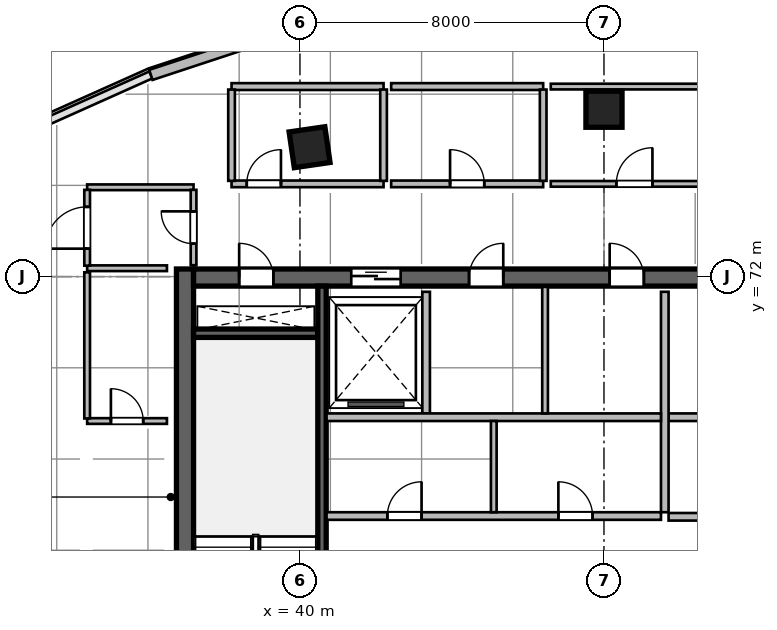
"""IFC4 building model, lengths in metres.
Left out: names, types, materials, properties, quantities, classifications, styles, units other than length and angle.
Written with IfcOpenShell. Run it as: python <this file> out.ifc"""

import sys

from ifc_helpers import new_model, si_unit, direction, frame, frame_2d, origin, origin_2d, place, context, subcontext, project, spatial, rectangle, extrude, source, transform, mapped, element, fill, save


model = new_model("IFC4")
c1 = context("Model", 3, precision=1e-05, world=origin(), true_north=direction((0.0, 1.0)))
c2 = subcontext(c1, "Body", "Model", "MODEL_VIEW")
j1 = project(units=[si_unit("LENGTHUNIT", "METRE"), si_unit("PLANEANGLEUNIT", "RADIAN")], contexts=[c1])
p1 = place(None, origin())
s1 = spatial("IfcSite", under=j1, at=p1, CompositionType="ELEMENT")
p2 = place(p1, origin())
s2 = spatial("IfcBuilding", under=s1, at=p2, CompositionType="ELEMENT")
p3 = place(p2, frame((0.0, 0.0, 231.3)))
s3 = spatial("IfcBuildingStorey", under=s2, at=p3, CompositionType="ELEMENT", Elevation=231.3)
m1 = source(origin(), c2, "Body", "SweptSolid", [
    extrude(rectangle(XDim=12.0, YDim=0.45, at=frame_2d((6.0, 0.0))), origin(), (0.0, 0.0, 1.0), 3.9),
])
p4 = place(p3, frame((36.975, 60.2, 0.0), z_axis=(0.0, 0.0, 1.0), x_axis=(0.0, 1.0, 0.0)))
e1 = element("IfcWall", 1, at=p4, inside=s3, PredefinedType="SHEAR", context=c2, shape_type="MappedRepresentation", body=[
    mapped(m1, transform((0.0, 0.0, 0.0), scale=1.0)),
])
m2 = source(origin(), c2, "Body", "SweptSolid", [
    extrude(rectangle(XDim=21.6, YDim=0.45, at=frame_2d((10.8, 0.0))), origin(), (0.0, 0.0, 1.0), 3.9),
])
p5 = place(p3, frame((37.2, 71.975, 0.0), z_axis=(0.0, 0.0, 1.0), x_axis=(1.0, 0.0, 0.0)))
e2 = element("IfcWall", 2, at=p5, inside=s3, PredefinedType="SHEAR", context=c2, shape_type="MappedRepresentation", body=[
    mapped(m2, transform((0.0, 0.0, 0.0), scale=1.0)),
])
p6 = place(p5, frame((1.2, 0.0, 0.0)))
e3 = element("IfcOpeningElement", 3, at=p6, cuts=e2, PredefinedType="OPENING", context=c2, shape_type="SweptSolid", body=[
    extrude(rectangle(XDim=0.9, YDim=2.1, at=frame_2d((0.45, 1.05))), frame((0.0, 0.235, 0.0), z_axis=(0.0, -1.0, 0.0), x_axis=(1.0, 0.0, 0.0)), (0.0, 0.0, 1.0), 0.47),
])
p7 = place(p5, frame((14.7, 0.0, 0.0)))
e4 = element("IfcOpeningElement", 4, at=p7, cuts=e2, PredefinedType="OPENING", context=c2, shape_type="SweptSolid", body=[
    extrude(rectangle(XDim=1.2, YDim=2.15, at=frame_2d((0.6, 1.075))), frame((0.0, 0.235, 0.0), z_axis=(0.0, -1.0, 0.0), x_axis=(1.0, 0.0, 0.0)), (0.0, 0.0, 1.0), 0.47),
])
p8 = place(p5, frame((4.15, 0.0, 0.0)))
e5 = element("IfcOpeningElement", 5, at=p8, cuts=e2, PredefinedType="OPENING", context=c2, shape_type="SweptSolid", body=[
    extrude(rectangle(XDim=1.3, YDim=2.15, at=frame_2d((0.65, 1.075))), frame((0.0, 0.235, 0.0), z_axis=(0.0, -1.0, 0.0), x_axis=(1.0, 0.0, 0.0)), (0.0, 0.0, 1.0), 0.47),
])
p9 = place(p5, frame((7.25, 0.0, 0.0)))
e6 = element("IfcOpeningElement", 6, at=p9, cuts=e2, PredefinedType="OPENING", context=c2, shape_type="SweptSolid", body=[
    extrude(rectangle(XDim=0.9, YDim=2.1, at=frame_2d((0.45, 1.05))), frame((0.0, 0.235, 0.0), z_axis=(0.0, -1.0, 0.0), x_axis=(1.0, 0.0, 0.0)), (0.0, 0.0, 1.0), 0.47),
])
p10 = place(p5, frame((10.95, 0.0, 0.0)))
e7 = element("IfcOpeningElement", 7, at=p10, cuts=e2, PredefinedType="OPENING", context=c2, shape_type="SweptSolid", body=[
    extrude(rectangle(XDim=0.9, YDim=2.1, at=frame_2d((0.45, 1.05))), frame((0.0, 0.235, 0.0), z_axis=(0.0, -1.0, 0.0), x_axis=(1.0, 0.0, 0.0)), (0.0, 0.0, 1.0), 0.47),
])
m3 = source(origin(), c2, "Body", "SweptSolid", [
    extrude(rectangle(XDim=3.27, YDim=0.22, at=frame_2d((1.635, 0.0))), origin(), (0.0, 0.0, 1.0), 3.9),
])
p11 = place(p3, frame((37.2, 70.51, 0.0), z_axis=(0.0, 0.0, 1.0), x_axis=(1.0, 0.0, 0.0)))
e8 = element("IfcWall", 8, at=p11, inside=s3, PredefinedType="SHEAR", context=c2, shape_type="MappedRepresentation", body=[
    mapped(m3, transform((0.0, 0.0, 0.0), scale=1.0)),
])
m4 = source(origin(), c2, "Body", "SweptSolid", [
    extrude(rectangle(XDim=11.1, YDim=0.22, at=frame_2d((5.55, 0.0))), origin(), (0.0, 0.0, 1.0), 3.9),
])
p12 = place(p3, frame((40.58, 60.65, 0.0), z_axis=(0.0, 0.0, 1.0), x_axis=(0.0, 1.0, 0.0)))
e9 = element("IfcWall", 9, at=p12, inside=s3, PredefinedType="SHEAR", context=c2, shape_type="MappedRepresentation", body=[
    mapped(m4, transform((0.0, 0.0, 0.0), scale=1.0)),
])
m5 = source(origin(), c2, "Body", "SweptSolid", [
    extrude(rectangle(XDim=0.95, YDim=0.95, at=origin_2d()), origin(), (0.0, 0.0, 1.0), 3.9),
])
for number, where, z_axis, x_axis in (
    (10, (40.253, 75.404, 0.0), (0.0, 0.0, 1.0), (-0.143, 0.99, 0.0)),
    (11, (48.0, 76.404, 0.0), (0.0, 0.0, 1.0), (0.0, 1.0, 0.0)),
):
    element("IfcColumn", number, at=place(p3, frame(where, z_axis=z_axis, x_axis=x_axis)), inside=s3, PredefinedType="COLUMN", context=c2, shape_type="MappedRepresentation", body=[
        mapped(m5, transform((0.0, 0.0, 0.0), scale=1.0)),
    ])
m6 = source(origin(), c2, "Body", "SweptSolid", [
    extrude(rectangle(XDim=3.557, YDim=0.28, at=frame_2d((1.778, 0.0))), origin(), (0.0, 0.0, 1.0), 3.65),
])
p13 = place(p3, frame((36.077, 77.307, 0.0), z_axis=(0.0, 0.0, 1.0), x_axis=(0.949687460385, 0.31319918197, 0.0)))
e12 = element("IfcWall", 12, at=p13, inside=s3, PredefinedType="SOLIDWALL", context=c2, shape_type="MappedRepresentation", body=[
    mapped(m6, transform((0.0, 0.0, 0.0), scale=1.0)),
])
m7 = source(origin(), c2, "Body", "SweptSolid", [
    extrude(rectangle(XDim=5.62, YDim=0.2, at=frame_2d((2.81, 0.0))), origin(), (0.0, 0.0, 1.0), 3.65),
])
p14 = place(p3, frame((49.7, 68.3, 0.0), z_axis=(0.0, 0.0, 1.0), x_axis=(1.0, 0.0, 0.0)))
e13 = element("IfcWall", 13, at=p14, inside=s3, PredefinedType="SOLIDWALL", context=c2, shape_type="MappedRepresentation", body=[
    mapped(m7, transform((0.0, 0.0, 0.0), scale=1.0)),
])
p15 = place(p14, frame((1.6, 0.0, 0.0)))
e14 = element("IfcOpeningElement", 14, at=p15, cuts=e13, PredefinedType="OPENING", context=c2, shape_type="SweptSolid", body=[
    extrude(rectangle(XDim=1.1, YDim=2.15, at=frame_2d((0.55, 1.075))), frame((0.0, 0.11, 0.0), z_axis=(0.0, -1.0, 0.0), x_axis=(1.0, 0.0, 0.0)), (0.0, 0.0, 1.0), 0.22),
])
p16 = place(p14, frame((3.7, 0.0, 0.0)))
e15 = element("IfcOpeningElement", 15, at=p16, cuts=e13, PredefinedType="OPENING", context=c2, shape_type="SweptSolid", body=[
    extrude(rectangle(XDim=1.1, YDim=2.15, at=frame_2d((0.55, 1.075))), frame((0.0, 0.11, 0.0), z_axis=(0.0, -1.0, 0.0), x_axis=(1.0, 0.0, 0.0)), (0.0, 0.0, 1.0), 0.22),
])
m8 = source(origin(), c2, "Body", "SweptSolid", [
    extrude(rectangle(XDim=5.8, YDim=0.2, at=frame_2d((2.9, 0.0))), origin(), (0.0, 0.0, 1.0), 3.65),
])
p17 = place(p3, frame((49.6, 65.8, 0.0), z_axis=(0.0, 0.0, 1.0), x_axis=(0.0, 1.0, 0.0)))
e16 = element("IfcWall", 16, at=p17, inside=s3, PredefinedType="SOLIDWALL", context=c2, shape_type="MappedRepresentation", body=[
    mapped(m8, transform((0.0, 0.0, 0.0), scale=1.0)),
])
p18 = place(p3, frame((49.7, 65.68, 0.0), z_axis=(0.0, 0.0, 1.0), x_axis=(1.0, 0.0, 0.0)))
e17 = element("IfcWall", 17, at=p18, inside=s3, PredefinedType="SOLIDWALL", context=c2, shape_type="MappedRepresentation", body=[
    mapped(m7, transform((0.0, 0.0, 0.0), scale=1.0)),
])
m9 = source(origin(), c2, "Body", "SweptSolid", [
    extrude(rectangle(XDim=3.2, YDim=0.2, at=frame_2d((1.6, 0.0))), origin(), (0.0, 0.0, 1.0), 3.65),
])
p19 = place(p3, frame((43.32, 68.4, 0.0), z_axis=(0.0, 0.0, 1.0), x_axis=(0.0, 1.0, 0.0)))
e18 = element("IfcWall", 18, at=p19, inside=s3, PredefinedType="SOLIDWALL", context=c2, shape_type="MappedRepresentation", body=[
    mapped(m9, transform((0.0, 0.0, 0.0), scale=1.0)),
])
m10 = source(origin(), c2, "Body", "SweptSolid", [
    extrude(rectangle(XDim=8.8, YDim=0.2, at=frame_2d((4.4, 0.0))), origin(), (0.0, 0.0, 1.0), 3.65),
])
p20 = place(p3, frame((40.7, 68.3, 0.0), z_axis=(0.0, 0.0, 1.0), x_axis=(1.0, 0.0, 0.0)))
e19 = element("IfcWall", 19, at=p20, inside=s3, PredefinedType="SOLIDWALL", context=c2, shape_type="MappedRepresentation", body=[
    mapped(m10, transform((0.0, 0.0, 0.0), scale=1.0)),
])
m11 = source(origin(), c2, "Body", "SweptSolid", [
    extrude(rectangle(XDim=3.33, YDim=0.15, at=frame_2d((1.665, 0.0))), origin(), (0.0, 0.0, 1.0), 3.65),
])
p21 = place(p3, frame((46.45, 68.4, 0.0), z_axis=(0.0, 0.0, 1.0), x_axis=(0.0, 1.0, 0.0)))
e20 = element("IfcWall", 20, at=p21, inside=s3, PredefinedType="PARTITIONING", context=c2, shape_type="MappedRepresentation", body=[
    mapped(m11, transform((0.0, 0.0, 0.0), scale=1.0)),
])
p22 = place(p3, frame((40.7, 65.7, 0.0), z_axis=(0.0, 0.0, 1.0), x_axis=(1.0, 0.0, 0.0)))
e21 = element("IfcWall", 21, at=p22, inside=s3, PredefinedType="SOLIDWALL", context=c2, shape_type="MappedRepresentation", body=[
    mapped(m10, transform((0.0, 0.0, 0.0), scale=1.0)),
])
p23 = place(p22, frame((1.6, 0.0, 0.0)))
e22 = element("IfcOpeningElement", 22, at=p23, cuts=e21, PredefinedType="OPENING", context=c2, shape_type="SweptSolid", body=[
    extrude(rectangle(XDim=0.9, YDim=2.1, at=frame_2d((0.45, 1.05))), frame((0.0, 0.11, 0.0), z_axis=(0.0, -1.0, 0.0), x_axis=(1.0, 0.0, 0.0)), (0.0, 0.0, 1.0), 0.22),
])
p24 = place(p22, frame((6.1, 0.0, 0.0)))
e23 = element("IfcOpeningElement", 23, at=p24, cuts=e21, PredefinedType="OPENING", context=c2, shape_type="SweptSolid", body=[
    extrude(rectangle(XDim=0.9, YDim=2.1, at=frame_2d((0.45, 1.05))), frame((0.0, 0.11, 0.0), z_axis=(0.0, -1.0, 0.0), x_axis=(1.0, 0.0, 0.0)), (0.0, 0.0, 1.0), 0.22),
])
m12 = source(origin(), c2, "Body", "SweptSolid", [
    extrude(rectangle(XDim=2.4, YDim=0.15, at=frame_2d((1.2, 0.0))), origin(), (0.0, 0.0, 1.0), 3.65),
])
p25 = place(p3, frame((45.1, 65.8, 0.0), z_axis=(0.0, 0.0, 1.0), x_axis=(0.0, 1.0, 0.0)))
e24 = element("IfcWall", 24, at=p25, inside=s3, PredefinedType="PARTITIONING", context=c2, shape_type="MappedRepresentation", body=[
    mapped(m12, transform((0.0, 0.0, 0.0), scale=1.0)),
])
m13 = source(origin(), c2, "Body", "SweptSolid", [
    extrude(rectangle(XDim=2.1, YDim=0.15, at=frame_2d((1.05, 0.0))), origin(), (0.0, 0.0, 1.0), 3.65),
])
p26 = place(p3, frame((34.4, 72.22, 0.0), z_axis=(0.0, 0.0, 1.0), x_axis=(1.0, 0.0, 0.0)))
e25 = element("IfcWall", 25, at=p26, inside=s3, PredefinedType="PARTITIONING", context=c2, shape_type="MappedRepresentation", body=[
    mapped(m13, transform((0.0, 0.0, 0.0), scale=1.0)),
])
m14 = source(origin(), c2, "Body", "SweptSolid", [
    extrude(rectangle(XDim=2.8, YDim=0.15, at=frame_2d((1.4, 0.0))), origin(), (0.0, 0.0, 1.0), 3.65),
])
p27 = place(p3, frame((34.4, 74.35, 0.0), z_axis=(0.0, 0.0, 1.0), x_axis=(1.0, 0.0, 0.0)))
e26 = element("IfcWall", 26, at=p27, inside=s3, PredefinedType="PARTITIONING", context=c2, shape_type="MappedRepresentation", body=[
    mapped(m14, transform((0.0, 0.0, 0.0), scale=1.0)),
])
m15 = source(origin(), c2, "Body", "SweptSolid", [
    extrude(rectangle(XDim=1.995, YDim=0.15, at=frame_2d((0.998, 0.0))), origin(), (0.0, 0.0, 1.0), 3.65),
])
p28 = place(p3, frame((34.4, 72.288, 0.0), z_axis=(0.0, 0.0, 1.0), x_axis=(0.0, 1.0, 0.0)))
e27 = element("IfcWall", 27, at=p28, inside=s3, PredefinedType="PARTITIONING", context=c2, shape_type="MappedRepresentation", body=[
    mapped(m15, transform((0.0, 0.0, 0.0), scale=1.0)),
])
p29 = place(p28, frame((0.448, 0.0, 0.0)))
e28 = element("IfcOpeningElement", 28, at=p29, cuts=e27, PredefinedType="OPENING", context=c2, shape_type="SweptSolid", body=[
    extrude(rectangle(XDim=1.1, YDim=2.15, at=frame_2d((0.55, 1.075))), frame((0.0, 0.085, 0.0), z_axis=(0.0, -1.0, 0.0), x_axis=(1.0, 0.0, 0.0)), (0.0, 0.0, 1.0), 0.17),
])
m16 = source(origin(), c2, "Body", "SweptSolid", [
    extrude(rectangle(XDim=1.982, YDim=0.15, at=frame_2d((0.991, 0.0))), origin(), (0.0, 0.0, 1.0), 3.65),
])
p30 = place(p3, frame((37.2, 72.3, 0.0), z_axis=(0.0, 0.0, 1.0), x_axis=(0.0, 1.0, 0.0)))
e29 = element("IfcWall", 29, at=p30, inside=s3, PredefinedType="PARTITIONING", context=c2, shape_type="MappedRepresentation", body=[
    mapped(m16, transform((0.0, 0.0, 0.0), scale=1.0)),
])
p31 = place(p30, frame((0.566, 0.0, 0.0)))
e30 = element("IfcOpeningElement", 30, at=p31, cuts=e29, PredefinedType="OPENING", context=c2, shape_type="SweptSolid", body=[
    extrude(rectangle(XDim=0.85, YDim=2.1, at=frame_2d((0.425, 1.05))), frame((0.0, 0.085, 0.0), z_axis=(0.0, -1.0, 0.0), x_axis=(1.0, 0.0, 0.0)), (0.0, 0.0, 1.0), 0.17),
])
p32 = place(p3, frame((34.4, 68.2, 0.0), z_axis=(0.0, 0.0, 1.0), x_axis=(1.0, 0.0, 0.0)))
e31 = element("IfcWall", 31, at=p32, inside=s3, PredefinedType="PARTITIONING", context=c2, shape_type="MappedRepresentation", body=[
    mapped(m13, transform((0.0, 0.0, 0.0), scale=1.0)),
])
p33 = place(p32, frame((0.625, 0.0, 0.0)))
e32 = element("IfcOpeningElement", 32, at=p33, cuts=e31, PredefinedType="OPENING", context=c2, shape_type="SweptSolid", body=[
    extrude(rectangle(XDim=0.85, YDim=2.1, at=frame_2d((0.425, 1.05))), frame((0.0, 0.085, 0.0), z_axis=(0.0, -1.0, 0.0), x_axis=(1.0, 0.0, 0.0)), (0.0, 0.0, 1.0), 0.17),
])
m17 = source(origin(), c2, "Body", "SweptSolid", [
    extrude(rectangle(XDim=3.845, YDim=0.15, at=frame_2d((1.922, 0.0))), origin(), (0.0, 0.0, 1.0), 3.65),
])
p34 = place(p3, frame((34.4, 68.268, 0.0), z_axis=(0.0, 0.0, 1.0), x_axis=(0.0, 1.0, 0.0)))
e33 = element("IfcWall", 33, at=p34, inside=s3, PredefinedType="PARTITIONING", context=c2, shape_type="MappedRepresentation", body=[
    mapped(m17, transform((0.0, 0.0, 0.0), scale=1.0)),
])
m18 = source(origin(), c2, "Body", "SweptSolid", [
    extrude(rectangle(XDim=4.0, YDim=0.175, at=frame_2d((2.0, 0.0))), origin(), (0.0, 0.0, 1.0), 3.65),
])
p35 = place(p3, frame((38.2, 74.44, 0.0), z_axis=(0.0, 0.0, 1.0), x_axis=(1.0, 0.0, 0.0)))
e34 = element("IfcWall", 34, at=p35, inside=s3, PredefinedType="PARTITIONING", context=c2, shape_type="MappedRepresentation", body=[
    mapped(m18, transform((0.0, 0.0, 0.0), scale=1.0)),
])
p36 = place(p35, frame((0.4, 0.0, 0.0)))
e35 = element("IfcOpeningElement", 35, at=p36, cuts=e34, PredefinedType="OPENING", context=c2, shape_type="SweptSolid", body=[
    extrude(rectangle(XDim=0.9, YDim=2.08, at=frame_2d((0.45, 1.04))), frame((0.0, 0.098, 0.0), z_axis=(0.0, -1.0, 0.0), x_axis=(1.0, 0.0, 0.0)), (0.0, 0.0, 1.0), 0.195),
])
m19 = source(origin(), c2, "Body", "SweptSolid", [
    extrude(rectangle(XDim=4.0, YDim=0.18, at=frame_2d((2.0, 0.0))), origin(), (0.0, 0.0, 1.0), 3.65),
])
p37 = place(p3, frame((38.2, 77.0, 0.0), z_axis=(0.0, 0.0, 1.0), x_axis=(1.0, 0.0, 0.0)))
e36 = element("IfcWall", 36, at=p37, inside=s3, PredefinedType="PLUMBINGWALL", context=c2, shape_type="MappedRepresentation", body=[
    mapped(m19, transform((0.0, 0.0, 0.0), scale=1.0)),
])
m20 = source(origin(), c2, "Body", "SweptSolid", [
    extrude(rectangle(XDim=2.403, YDim=0.175, at=frame_2d((1.201, 0.0))), origin(), (0.0, 0.0, 1.0), 3.65),
])
for number, where, z_axis, x_axis in (
    (37, (38.2, 74.519, 0.0), (0.0, 0.0, 1.0), (0.0, 1.0, 0.0)),
    (38, (42.2, 74.519, 0.0), (0.0, 0.0, 1.0), (0.0, 1.0, 0.0)),
):
    element("IfcWall", number, at=place(p3, frame(where, z_axis=z_axis, x_axis=x_axis)), inside=s3, PredefinedType="PARTITIONING", context=c2, shape_type="MappedRepresentation", body=[
        mapped(m20, transform((0.0, 0.0, 0.0), scale=1.0)),
    ])
p38 = place(p3, frame((42.4, 74.44, 0.0), z_axis=(0.0, 0.0, 1.0), x_axis=(1.0, 0.0, 0.0)))
e39 = element("IfcWall", 39, at=p38, inside=s3, PredefinedType="PARTITIONING", context=c2, shape_type="MappedRepresentation", body=[
    mapped(m18, transform((0.0, 0.0, 0.0), scale=1.0)),
])
p39 = place(p38, frame((1.55, 0.0, 0.0)))
e40 = element("IfcOpeningElement", 40, at=p39, cuts=e39, PredefinedType="OPENING", context=c2, shape_type="SweptSolid", body=[
    extrude(rectangle(XDim=0.9, YDim=2.08, at=frame_2d((0.45, 1.04))), frame((0.0, 0.098, 0.0), z_axis=(0.0, -1.0, 0.0), x_axis=(1.0, 0.0, 0.0)), (0.0, 0.0, 1.0), 0.195),
])
p40 = place(p3, frame((42.4, 77.0, 0.0), z_axis=(0.0, 0.0, 1.0), x_axis=(1.0, 0.0, 0.0)))
e41 = element("IfcWall", 41, at=p40, inside=s3, PredefinedType="PLUMBINGWALL", context=c2, shape_type="MappedRepresentation", body=[
    mapped(m19, transform((0.0, 0.0, 0.0), scale=1.0)),
])
p41 = place(p3, frame((46.4, 74.519, 0.0), z_axis=(0.0, 0.0, 1.0), x_axis=(0.0, 1.0, 0.0)))
e42 = element("IfcWall", 42, at=p41, inside=s3, PredefinedType="PARTITIONING", context=c2, shape_type="MappedRepresentation", body=[
    mapped(m20, transform((0.0, 0.0, 0.0), scale=1.0)),
])
m21 = source(origin(), c2, "Body", "SweptSolid", [
    extrude(rectangle(XDim=4.4, YDim=0.15, at=frame_2d((2.2, 0.0))), origin(), (0.0, 0.0, 1.0), 3.65),
])
p42 = place(p3, frame((46.6, 74.44, 0.0), z_axis=(0.0, 0.0, 1.0), x_axis=(1.0, 0.0, 0.0)))
e43 = element("IfcWall", 43, at=p42, inside=s3, PredefinedType="PARTITIONING", context=c2, shape_type="MappedRepresentation", body=[
    mapped(m21, transform((0.0, 0.0, 0.0), scale=1.0)),
])
p43 = place(p42, frame((1.725, 0.0, 0.0)))
e44 = element("IfcOpeningElement", 44, at=p43, cuts=e43, PredefinedType="OPENING", context=c2, shape_type="SweptSolid", body=[
    extrude(rectangle(XDim=0.95, YDim=2.1, at=frame_2d((0.475, 1.05))), frame((0.0, 0.085, 0.0), z_axis=(0.0, -1.0, 0.0), x_axis=(1.0, 0.0, 0.0)), (0.0, 0.0, 1.0), 0.17),
])
p44 = place(p3, frame((46.6, 77.0, 0.0), z_axis=(0.0, 0.0, 1.0), x_axis=(1.0, 0.0, 0.0)))
e45 = element("IfcWall", 45, at=p44, inside=s3, PredefinedType="PARTITIONING", context=c2, shape_type="MappedRepresentation", body=[
    mapped(m21, transform((0.0, 0.0, 0.0), scale=1.0)),
])
m22 = source(origin(), c2, "Body", "SweptSolid", [
    extrude(rectangle(XDim=0.9, YDim=2.1, at=frame_2d((0.45, 1.05))), frame((0.0, 0.025, 0.0), z_axis=(0.0, -1.0, 0.0), x_axis=(1.0, 0.0, 0.0)), (0.0, 0.0, 1.0), 0.05),
])
p45 = place(p6, origin())
e46 = element("IfcDoor", 46, at=p45, inside=s3, OperationType="SINGLE_SWING_LEFT", PredefinedType="DOOR", context=c2, shape_type="MappedRepresentation", body=[
    mapped(m22, transform((0.0, 0.0, 0.0), scale=1.0)),
])
fill(e3, e46)
m23 = source(origin(), c2, "Body", "SweptSolid", [
    extrude(rectangle(XDim=1.3, YDim=2.15, at=frame_2d((0.65, 1.075))), frame((0.0, 0.025, 0.0), z_axis=(0.0, -1.0, 0.0), x_axis=(1.0, 0.0, 0.0)), (0.0, 0.0, 1.0), 0.05),
])
p46 = place(p8, origin())
e47 = element("IfcDoor", 47, at=p46, inside=s3, OperationType="DOUBLE_DOOR_SLIDING", PredefinedType="DOOR", context=c2, shape_type="MappedRepresentation", body=[
    mapped(m23, transform((0.0, 0.0, 0.0), scale=1.0)),
])
fill(e5, e47)
p47 = place(p9, origin())
e48 = element("IfcDoor", 48, at=p47, inside=s3, OperationType="SINGLE_SWING_RIGHT", PredefinedType="DOOR", context=c2, shape_type="MappedRepresentation", body=[
    mapped(m22, transform((0.0, 0.0, 0.0), scale=1.0)),
])
fill(e6, e48)
p48 = place(p10, origin())
e49 = element("IfcDoor", 49, at=p48, inside=s3, OperationType="SINGLE_SWING_LEFT", PredefinedType="DOOR", context=c2, shape_type="MappedRepresentation", body=[
    mapped(m22, transform((0.0, 0.0, 0.0), scale=1.0)),
])
fill(e7, e49)
p49 = place(p23, origin())
e50 = element("IfcDoor", 50, at=p49, inside=s3, OperationType="SINGLE_SWING_RIGHT", PredefinedType="DOOR", context=c2, shape_type="MappedRepresentation", body=[
    mapped(m22, transform((0.0, 0.0, 0.0), scale=1.0)),
])
fill(e22, e50)
p50 = place(p24, origin())
e51 = element("IfcDoor", 51, at=p50, inside=s3, OperationType="SINGLE_SWING_LEFT", PredefinedType="DOOR", context=c2, shape_type="MappedRepresentation", body=[
    mapped(m22, transform((0.0, 0.0, 0.0), scale=1.0)),
])
fill(e23, e51)
m24 = source(origin(), c2, "Body", "SweptSolid", [
    extrude(rectangle(XDim=0.85, YDim=2.1, at=frame_2d((0.425, 1.05))), frame((0.0, 0.025, 0.0), z_axis=(0.0, -1.0, 0.0), x_axis=(1.0, 0.0, 0.0)), (0.0, 0.0, 1.0), 0.05),
])
p51 = place(p31, origin())
e52 = element("IfcDoor", 52, at=p51, inside=s3, OperationType="SINGLE_SWING_RIGHT", PredefinedType="DOOR", context=c2, shape_type="MappedRepresentation", body=[
    mapped(m24, transform((0.0, 0.0, 0.0), scale=1.0)),
])
fill(e30, e52)
p52 = place(p33, origin())
e53 = element("IfcDoor", 53, at=p52, inside=s3, OperationType="SINGLE_SWING_LEFT", PredefinedType="DOOR", context=c2, shape_type="MappedRepresentation", body=[
    mapped(m24, transform((0.0, 0.0, 0.0), scale=1.0)),
])
fill(e32, e53)
m25 = source(origin(), c2, "Body", "SweptSolid", [
    extrude(rectangle(XDim=0.9, YDim=2.08, at=frame_2d((0.45, 1.04))), frame((0.0, 0.025, 0.0), z_axis=(0.0, -1.0, 0.0), x_axis=(1.0, 0.0, 0.0)), (0.0, 0.0, 1.0), 0.05),
])
p53 = place(p36, origin())
e54 = element("IfcDoor", 54, at=p53, inside=s3, OperationType="SINGLE_SWING_RIGHT", PredefinedType="DOOR", context=c2, shape_type="MappedRepresentation", body=[
    mapped(m25, transform((0.0, 0.0, 0.0), scale=1.0)),
])
fill(e35, e54)
p54 = place(p39, origin())
e55 = element("IfcDoor", 55, at=p54, inside=s3, OperationType="SINGLE_SWING_LEFT", PredefinedType="DOOR", context=c2, shape_type="MappedRepresentation", body=[
    mapped(m25, transform((0.0, 0.0, 0.0), scale=1.0)),
])
fill(e40, e55)
m26 = source(origin(), c2, "Body", "SweptSolid", [
    extrude(rectangle(XDim=0.95, YDim=2.1, at=frame_2d((0.475, 1.05))), frame((0.0, 0.025, 0.0), z_axis=(0.0, -1.0, 0.0), x_axis=(1.0, 0.0, 0.0)), (0.0, 0.0, 1.0), 0.05),
])
p55 = place(p43, origin())
e56 = element("IfcDoor", 56, at=p55, inside=s3, OperationType="SINGLE_SWING_RIGHT", PredefinedType="DOOR", context=c2, shape_type="MappedRepresentation", body=[
    mapped(m26, transform((0.0, 0.0, 0.0), scale=1.0)),
])
fill(e44, e56)
m27 = source(origin(), c2, "Body", "SweptSolid", [
    extrude(rectangle(XDim=1.1, YDim=2.15, at=frame_2d((0.55, 1.075))), frame((0.0, 0.025, 0.0), z_axis=(0.0, -1.0, 0.0), x_axis=(1.0, 0.0, 0.0)), (0.0, 0.0, 1.0), 0.05),
])
p56 = place(p29, origin())
e57 = element("IfcDoor", 57, at=p56, inside=s3, OperationType="SINGLE_SWING_LEFT", PredefinedType="DOOR", context=c2, shape_type="MappedRepresentation", body=[
    mapped(m27, transform((0.0, 0.0, 0.0), scale=1.0)),
])
fill(e28, e57)
save(model, sys.argv[1])
